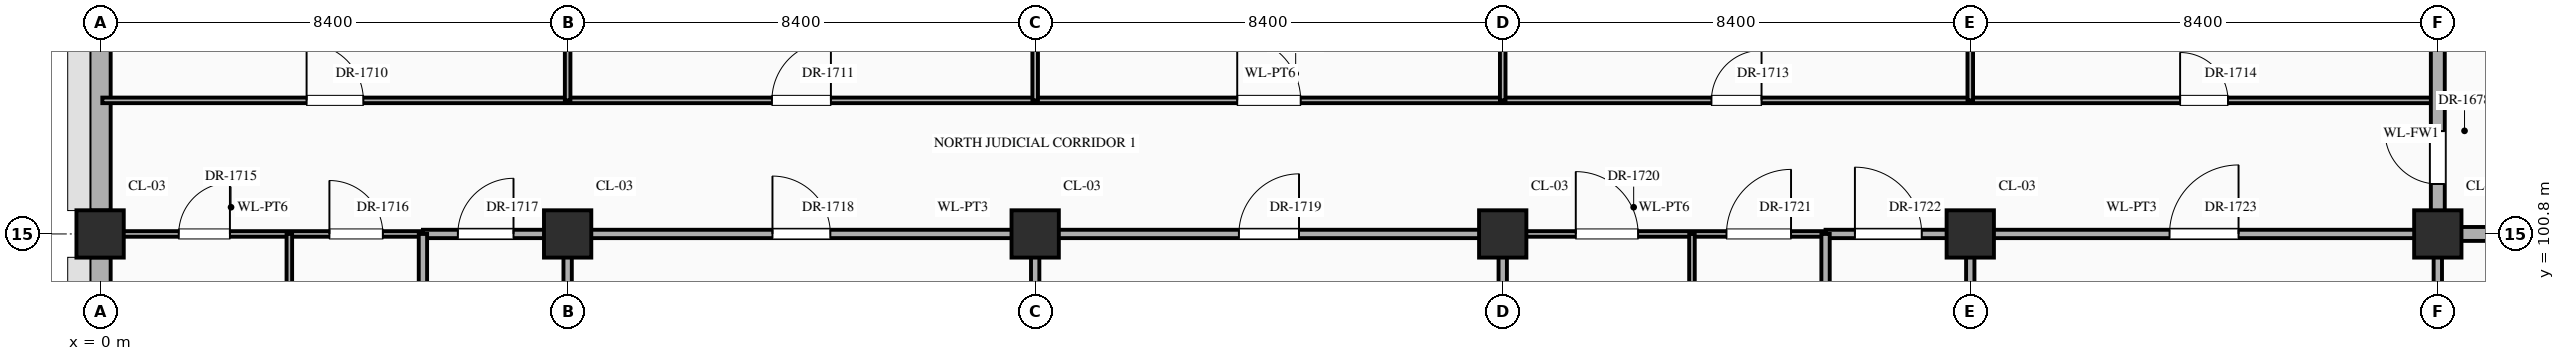
"""IFC4 building model, lengths in metres.
Left out: names, types, materials, properties, quantities, classifications, styles, units other than length and angle.
Written with IfcOpenShell. Run it as: python <this file> out.ifc"""

import sys

from ifc_helpers import new_model, si_unit, direction, frame, frame_2d, origin, origin_2d, place, context, subcontext, project, spatial, rectangle, extrude, element, fill, save


model = new_model("IFC4")
c1 = context("Model", 3, precision=1e-05, world=origin(), true_north=direction((0.0, 1.0)))
c2 = subcontext(c1, "Body", "Model", "MODEL_VIEW")
j1 = project(units=[si_unit("LENGTHUNIT", "METRE"), si_unit("PLANEANGLEUNIT", "RADIAN")], contexts=[c1])
p1 = place(None, origin())
s1 = spatial("IfcSite", under=j1, at=p1, CompositionType="ELEMENT")
p2 = place(p1, origin())
s2 = spatial("IfcBuilding", under=s1, at=p2, CompositionType="ELEMENT")
p3 = place(p2, frame((0.0, 0.0, 16.2)))
s3 = spatial("IfcBuildingStorey", under=s2, at=p3, CompositionType="ELEMENT", Elevation=16.2)
for number, where, z_axis, x_axis in (
    (1, (0.0, 100.8, 0.0), (0.0, 0.0, 1.0), (1.0, 0.0, 0.0)),
    (2, (8.4, 100.8, 0.0), (0.0, 0.0, 1.0), (1.0, 0.0, 0.0)),
    (3, (16.8, 100.8, 0.0), (0.0, 0.0, 1.0), (1.0, 0.0, 0.0)),
    (4, (25.2, 100.8, 0.0), (0.0, 0.0, 1.0), (1.0, 0.0, 0.0)),
    (5, (33.6, 100.8, 0.0), (0.0, 0.0, 1.0), (1.0, 0.0, 0.0)),
    (6, (42.0, 100.8, 0.0), (0.0, 0.0, 1.0), (1.0, 0.0, 0.0)),
):
    element("IfcColumn", number, at=place(p3, frame(where, z_axis=z_axis, x_axis=x_axis)), inside=s3, PredefinedType="COLUMN", context=c2, shape_type="SweptSolid", body=[
        extrude(rectangle(XDim=0.85, YDim=0.85, at=origin_2d()), origin(), (0.0, 0.0, 1.0), 5.4),
    ])
p4 = place(p3, frame((0.0, 94.02, 0.0), z_axis=(0.0, 0.0, 1.0), x_axis=(0.0, 1.0, 0.0)))
e7 = element("IfcWall", 7, at=p4, inside=s3, PredefinedType="STANDARD", context=c2, shape_type="SweptSolid", body=[
    extrude(rectangle(XDim=6.36, YDim=0.38, at=frame_2d((3.18, 0.0))), origin(), (0.0, 0.0, 1.0), 4.55),
])
p5 = place(p4, frame((3.955, 0.0, 0.85)))
e8 = element("IfcOpeningElement", 8, at=p5, cuts=e7, PredefinedType="OPENING", context=c2, shape_type="SweptSolid", body=[
    extrude(rectangle(XDim=1.05, YDim=1.38, at=frame_2d((0.525, 0.69))), frame((0.0, 0.202, 0.0), z_axis=(0.0, -1.0, 0.0), x_axis=(1.0, 0.0, 0.0)), (0.0, 0.0, 1.0), 0.404),
])
p6 = place(p3, frame((0.0, 101.22, 0.0), z_axis=(0.0, 0.0, 1.0), x_axis=(0.0, 1.0, 0.0)))
e9 = element("IfcWall", 9, at=p6, inside=s3, PredefinedType="STANDARD", context=c2, shape_type="SweptSolid", body=[
    extrude(rectangle(XDim=6.36, YDim=0.38, at=frame_2d((3.18, 0.0))), origin(), (0.0, 0.0, 1.0), 4.55),
])
p7 = place(p6, frame((3.955, 0.0, 0.85)))
e10 = element("IfcOpeningElement", 10, at=p7, cuts=e9, PredefinedType="OPENING", context=c2, shape_type="SweptSolid", body=[
    extrude(rectangle(XDim=1.05, YDim=1.56, at=frame_2d((0.525, 0.78))), frame((0.0, 0.202, 0.0), z_axis=(0.0, -1.0, 0.0), x_axis=(1.0, 0.0, 0.0)), (0.0, 0.0, 1.0), 0.404),
])
p8 = place(p3, frame((0.04, 100.8, 0.0), z_axis=(0.0, 0.0, 1.0), x_axis=(1.0, 0.0, 0.0)))
e11 = element("IfcWall", 11, at=p8, inside=s3, PredefinedType="STANDARD", context=c2, shape_type="SweptSolid", body=[
    extrude(rectangle(XDim=5.76, YDim=0.1, at=frame_2d((2.88, 0.0))), origin(), (0.0, 0.0, 1.0), 4.35),
])
p9 = place(p8, frame((1.373, 0.0, 0.0)))
e12 = element("IfcOpeningElement", 12, at=p9, cuts=e11, PredefinedType="OPENING", context=c2, shape_type="SweptSolid", body=[
    extrude(rectangle(XDim=0.92, YDim=2.15, at=frame_2d((0.46, 1.075))), frame((0.0, 0.062, 0.0), z_axis=(0.0, -1.0, 0.0), x_axis=(1.0, 0.0, 0.0)), (0.0, 0.0, 1.0), 0.124),
])
p10 = place(p8, frame((4.08, 0.0, 0.0)))
e13 = element("IfcOpeningElement", 13, at=p10, cuts=e11, PredefinedType="OPENING", context=c2, shape_type="SweptSolid", body=[
    extrude(rectangle(XDim=0.96, YDim=2.2, at=frame_2d((0.48, 1.1))), frame((0.0, 0.062, 0.0), z_axis=(0.0, -1.0, 0.0), x_axis=(1.0, 0.0, 0.0)), (0.0, 0.0, 1.0), 0.124),
])
p11 = place(p3, frame((5.8, 100.8, 0.0), z_axis=(0.0, 0.0, 1.0), x_axis=(1.0, 0.0, 0.0)))
e14 = element("IfcWall", 14, at=p11, inside=s3, PredefinedType="STANDARD", context=c2, shape_type="SweptSolid", body=[
    extrude(rectangle(XDim=19.4, YDim=0.15, at=frame_2d((9.7, 0.0))), origin(), (0.0, 0.0, 1.0), 4.2),
])
p12 = place(p11, frame((0.627, 0.0, 0.0)))
e15 = element("IfcOpeningElement", 15, at=p12, cuts=e14, PredefinedType="OPENING", context=c2, shape_type="SweptSolid", body=[
    extrude(rectangle(XDim=1.0, YDim=2.25, at=frame_2d((0.5, 1.125))), frame((0.0, 0.087, 0.0), z_axis=(0.0, -1.0, 0.0), x_axis=(1.0, 0.0, 0.0)), (0.0, 0.0, 1.0), 0.174),
])
p13 = place(p11, frame((6.28, 0.0, 0.0)))
e16 = element("IfcOpeningElement", 16, at=p13, cuts=e14, PredefinedType="OPENING", context=c2, shape_type="SweptSolid", body=[
    extrude(rectangle(XDim=1.04, YDim=2.2, at=frame_2d((0.52, 1.1))), frame((0.0, 0.087, 0.0), z_axis=(0.0, -1.0, 0.0), x_axis=(1.0, 0.0, 0.0)), (0.0, 0.0, 1.0), 0.174),
])
p14 = place(p11, frame((14.66, 0.0, 0.0)))
e17 = element("IfcOpeningElement", 17, at=p14, cuts=e14, PredefinedType="OPENING", context=c2, shape_type="SweptSolid", body=[
    extrude(rectangle(XDim=1.08, YDim=2.25, at=frame_2d((0.54, 1.125))), frame((0.0, 0.087, 0.0), z_axis=(0.0, -1.0, 0.0), x_axis=(1.0, 0.0, 0.0)), (0.0, 0.0, 1.0), 0.174),
])
p15 = place(p3, frame((25.2, 100.8, 0.0), z_axis=(0.0, 0.0, 1.0), x_axis=(1.0, 0.0, 0.0)))
e18 = element("IfcWall", 18, at=p15, inside=s3, PredefinedType="STANDARD", context=c2, shape_type="SweptSolid", body=[
    extrude(rectangle(XDim=5.8, YDim=0.1, at=frame_2d((2.9, 0.0))), origin(), (0.0, 0.0, 1.0), 4.27),
])
p16 = place(p15, frame((1.312, 0.0, 0.0)))
e19 = element("IfcOpeningElement", 19, at=p16, cuts=e18, PredefinedType="OPENING", context=c2, shape_type="SweptSolid", body=[
    extrude(rectangle(XDim=1.12, YDim=2.25, at=frame_2d((0.56, 1.125))), frame((0.0, 0.062, 0.0), z_axis=(0.0, -1.0, 0.0), x_axis=(1.0, 0.0, 0.0)), (0.0, 0.0, 1.0), 0.124),
])
p17 = place(p15, frame((4.02, 0.0, 0.0)))
e20 = element("IfcOpeningElement", 20, at=p17, cuts=e18, PredefinedType="OPENING", context=c2, shape_type="SweptSolid", body=[
    extrude(rectangle(XDim=1.16, YDim=2.3, at=frame_2d((0.58, 1.15))), frame((0.0, 0.062, 0.0), z_axis=(0.0, -1.0, 0.0), x_axis=(1.0, 0.0, 0.0)), (0.0, 0.0, 1.0), 0.124),
])
p18 = place(p3, frame((31.0, 100.8, 0.0), z_axis=(0.0, 0.0, 1.0), x_axis=(1.0, 0.0, 0.0)))
e21 = element("IfcWall", 21, at=p18, inside=s3, PredefinedType="STANDARD", context=c2, shape_type="SweptSolid", body=[
    extrude(rectangle(XDim=11.0, YDim=0.15, at=frame_2d((5.5, 0.0))), origin(), (0.0, 0.0, 1.0), 4.27),
])
p19 = place(p18, frame((0.528, 0.0, 0.0)))
e22 = element("IfcOpeningElement", 22, at=p19, cuts=e21, PredefinedType="OPENING", context=c2, shape_type="SweptSolid", body=[
    extrude(rectangle(XDim=1.2, YDim=2.35, at=frame_2d((0.6, 1.175))), frame((0.0, 0.087, 0.0), z_axis=(0.0, -1.0, 0.0), x_axis=(1.0, 0.0, 0.0)), (0.0, 0.0, 1.0), 0.174),
])
p20 = place(p18, frame((6.18, 0.0, 0.0)))
e23 = element("IfcOpeningElement", 23, at=p20, cuts=e21, PredefinedType="OPENING", context=c2, shape_type="SweptSolid", body=[
    extrude(rectangle(XDim=1.24, YDim=2.3, at=frame_2d((0.62, 1.15))), frame((0.0, 0.087, 0.0), z_axis=(0.0, -1.0, 0.0), x_axis=(1.0, 0.0, 0.0)), (0.0, 0.0, 1.0), 0.174),
])
p21 = place(p3, frame((42.0, 100.8, 0.0), z_axis=(0.0, 0.0, 1.0), x_axis=(1.0, 0.0, 0.0)))
e24 = element("IfcWall", 24, at=p21, inside=s3, PredefinedType="STANDARD", context=c2, shape_type="SweptSolid", body=[
    extrude(rectangle(XDim=4.2, YDim=0.25, at=frame_2d((2.1, 0.0))), origin(), (0.0, 0.0, 1.0), 4.27),
])
p22 = place(p3, frame((0.04, 103.2, 0.0), z_axis=(0.0, 0.0, 1.0), x_axis=(1.0, 0.0, 0.0)))
e25 = element("IfcWall", 25, at=p22, inside=s3, PredefinedType="STANDARD", context=c2, shape_type="SweptSolid", body=[
    extrude(rectangle(XDim=41.96, YDim=0.1, at=frame_2d((20.98, 0.0))), origin(), (0.0, 0.0, 1.0), 5.05),
])
p23 = place(p22, frame((3.67, 0.0, 0.0)))
e26 = element("IfcOpeningElement", 26, at=p23, cuts=e25, PredefinedType="OPENING", context=c2, shape_type="SweptSolid", body=[
    extrude(rectangle(XDim=1.02, YDim=2.4, at=frame_2d((0.51, 1.2))), frame((0.0, 0.062, 0.0), z_axis=(0.0, -1.0, 0.0), x_axis=(1.0, 0.0, 0.0)), (0.0, 0.0, 1.0), 0.124),
])
p24 = place(p22, frame((12.03, 0.0, 0.0)))
e27 = element("IfcOpeningElement", 27, at=p24, cuts=e25, PredefinedType="OPENING", context=c2, shape_type="SweptSolid", body=[
    extrude(rectangle(XDim=1.06, YDim=2.4, at=frame_2d((0.53, 1.2))), frame((0.0, 0.062, 0.0), z_axis=(0.0, -1.0, 0.0), x_axis=(1.0, 0.0, 0.0)), (0.0, 0.0, 1.0), 0.124),
])
p25 = place(p22, frame((20.39, 0.0, 0.0)))
e28 = element("IfcOpeningElement", 28, at=p25, cuts=e25, PredefinedType="OPENING", context=c2, shape_type="SweptSolid", body=[
    extrude(rectangle(XDim=1.14, YDim=2.4, at=frame_2d((0.57, 1.2))), frame((0.0, 0.062, 0.0), z_axis=(0.0, -1.0, 0.0), x_axis=(1.0, 0.0, 0.0)), (0.0, 0.0, 1.0), 0.124),
])
p26 = place(p22, frame((28.91, 0.0, 0.0)))
e29 = element("IfcOpeningElement", 29, at=p26, cuts=e25, PredefinedType="OPENING", context=c2, shape_type="SweptSolid", body=[
    extrude(rectangle(XDim=0.9, YDim=2.15, at=frame_2d((0.45, 1.075))), frame((0.0, 0.062, 0.0), z_axis=(0.0, -1.0, 0.0), x_axis=(1.0, 0.0, 0.0)), (0.0, 0.0, 1.0), 0.124),
])
p27 = place(p22, frame((37.33, 0.0, 0.0)))
e30 = element("IfcOpeningElement", 30, at=p27, cuts=e25, PredefinedType="OPENING", context=c2, shape_type="SweptSolid", body=[
    extrude(rectangle(XDim=0.86, YDim=2.1, at=frame_2d((0.43, 1.05))), frame((0.0, 0.062, 0.0), z_axis=(0.0, -1.0, 0.0), x_axis=(1.0, 0.0, 0.0)), (0.0, 0.0, 1.0), 0.124),
])
p28 = place(p3, frame((3.4, 96.0, 0.0), z_axis=(0.0, 0.0, 1.0), x_axis=(0.0, 1.0, 0.0)))
e31 = element("IfcWall", 31, at=p28, inside=s3, PredefinedType="STANDARD", context=c2, shape_type="SweptSolid", body=[
    extrude(rectangle(XDim=4.8, YDim=0.1, at=frame_2d((2.4, 0.0))), origin(), (0.0, 0.0, 1.0), 5.2),
])
p29 = place(p28, frame((1.84, 0.0, 0.0)))
e32 = element("IfcOpeningElement", 32, at=p29, cuts=e31, PredefinedType="OPENING", context=c2, shape_type="SweptSolid", body=[
    extrude(rectangle(XDim=1.12, YDim=2.25, at=frame_2d((0.56, 1.125))), frame((0.0, 0.062, 0.0), z_axis=(0.0, -1.0, 0.0), x_axis=(1.0, 0.0, 0.0)), (0.0, 0.0, 1.0), 0.124),
])
p30 = place(p3, frame((5.8, 96.0, 0.0), z_axis=(0.0, 0.0, 1.0), x_axis=(0.0, 1.0, 0.0)))
e33 = element("IfcWall", 33, at=p30, inside=s3, PredefinedType="STANDARD", context=c2, shape_type="SweptSolid", body=[
    extrude(rectangle(XDim=4.8, YDim=0.15, at=frame_2d((2.4, 0.0))), origin(), (0.0, 0.0, 1.0), 5.2),
])
p31 = place(p30, frame((1.82, 0.0, 0.0)))
e34 = element("IfcOpeningElement", 34, at=p31, cuts=e33, PredefinedType="OPENING", context=c2, shape_type="SweptSolid", body=[
    extrude(rectangle(XDim=1.16, YDim=2.3, at=frame_2d((0.58, 1.15))), frame((0.0, 0.087, 0.0), z_axis=(0.0, -1.0, 0.0), x_axis=(1.0, 0.0, 0.0)), (0.0, 0.0, 1.0), 0.174),
])
p32 = place(p3, frame((8.4, 96.0, 0.0), z_axis=(0.0, 0.0, 1.0), x_axis=(0.0, 1.0, 0.0)))
e35 = element("IfcWall", 35, at=p32, inside=s3, PredefinedType="STANDARD", context=c2, shape_type="SweptSolid", body=[
    extrude(rectangle(XDim=4.8, YDim=0.15, at=frame_2d((2.4, 0.0))), origin(), (0.0, 0.0, 1.0), 4.45),
])
p33 = place(p3, frame((8.4, 103.2, 0.0), z_axis=(0.0, 0.0, 1.0), x_axis=(0.0, 1.0, 0.0)))
e36 = element("IfcWall", 36, at=p33, inside=s3, PredefinedType="STANDARD", context=c2, shape_type="SweptSolid", body=[
    extrude(rectangle(XDim=4.76, YDim=0.1, at=frame_2d((2.38, 0.0))), origin(), (0.0, 0.0, 1.0), 4.45),
])
p34 = place(p3, frame((16.8, 96.0, 0.0), z_axis=(0.0, 0.0, 1.0), x_axis=(0.0, 1.0, 0.0)))
e37 = element("IfcWall", 37, at=p34, inside=s3, PredefinedType="STANDARD", context=c2, shape_type="SweptSolid", body=[
    extrude(rectangle(XDim=4.8, YDim=0.15, at=frame_2d((2.4, 0.0))), origin(), (0.0, 0.0, 1.0), 4.3),
])
p35 = place(p3, frame((16.8, 103.2, 0.0), z_axis=(0.0, 0.0, 1.0), x_axis=(0.0, 1.0, 0.0)))
e38 = element("IfcWall", 38, at=p35, inside=s3, PredefinedType="STANDARD", context=c2, shape_type="SweptSolid", body=[
    extrude(rectangle(XDim=4.76, YDim=0.1, at=frame_2d((2.38, 0.0))), origin(), (0.0, 0.0, 1.0), 4.3),
])
p36 = place(p3, frame((25.2, 96.0, 0.0), z_axis=(0.0, 0.0, 1.0), x_axis=(0.0, 1.0, 0.0)))
e39 = element("IfcWall", 39, at=p36, inside=s3, PredefinedType="STANDARD", context=c2, shape_type="SweptSolid", body=[
    extrude(rectangle(XDim=4.8, YDim=0.15, at=frame_2d((2.4, 0.0))), origin(), (0.0, 0.0, 1.0), 4.3),
])
p37 = place(p3, frame((25.2, 103.2, 0.0), z_axis=(0.0, 0.0, 1.0), x_axis=(0.0, 1.0, 0.0)))
e40 = element("IfcWall", 40, at=p37, inside=s3, PredefinedType="STANDARD", context=c2, shape_type="SweptSolid", body=[
    extrude(rectangle(XDim=4.76, YDim=0.1, at=frame_2d((2.38, 0.0))), origin(), (0.0, 0.0, 1.0), 4.3),
])
p38 = place(p3, frame((28.6, 96.0, 0.0), z_axis=(0.0, 0.0, 1.0), x_axis=(0.0, 1.0, 0.0)))
e41 = element("IfcWall", 41, at=p38, inside=s3, PredefinedType="STANDARD", context=c2, shape_type="SweptSolid", body=[
    extrude(rectangle(XDim=4.8, YDim=0.1, at=frame_2d((2.4, 0.0))), origin(), (0.0, 0.0, 1.0), 5.12),
])
p39 = place(p38, frame((1.8, 0.0, 0.0)))
e42 = element("IfcOpeningElement", 42, at=p39, cuts=e41, PredefinedType="OPENING", context=c2, shape_type="SweptSolid", body=[
    extrude(rectangle(XDim=1.2, YDim=2.35, at=frame_2d((0.6, 1.175))), frame((0.0, 0.062, 0.0), z_axis=(0.0, -1.0, 0.0), x_axis=(1.0, 0.0, 0.0)), (0.0, 0.0, 1.0), 0.124),
])
p40 = place(p3, frame((31.0, 96.0, 0.0), z_axis=(0.0, 0.0, 1.0), x_axis=(0.0, 1.0, 0.0)))
e43 = element("IfcWall", 43, at=p40, inside=s3, PredefinedType="STANDARD", context=c2, shape_type="SweptSolid", body=[
    extrude(rectangle(XDim=4.8, YDim=0.15, at=frame_2d((2.4, 0.0))), origin(), (0.0, 0.0, 1.0), 5.12),
])
p41 = place(p40, frame((1.78, 0.0, 0.0)))
e44 = element("IfcOpeningElement", 44, at=p41, cuts=e43, PredefinedType="OPENING", context=c2, shape_type="SweptSolid", body=[
    extrude(rectangle(XDim=1.24, YDim=2.3, at=frame_2d((0.62, 1.15))), frame((0.0, 0.087, 0.0), z_axis=(0.0, -1.0, 0.0), x_axis=(1.0, 0.0, 0.0)), (0.0, 0.0, 1.0), 0.174),
])
p42 = place(p3, frame((33.6, 96.0, 0.0), z_axis=(0.0, 0.0, 1.0), x_axis=(0.0, 1.0, 0.0)))
e45 = element("IfcWall", 45, at=p42, inside=s3, PredefinedType="STANDARD", context=c2, shape_type="SweptSolid", body=[
    extrude(rectangle(XDim=4.8, YDim=0.15, at=frame_2d((2.4, 0.0))), origin(), (0.0, 0.0, 1.0), 4.37),
])
p43 = place(p3, frame((33.6, 103.2, 0.0), z_axis=(0.0, 0.0, 1.0), x_axis=(0.0, 1.0, 0.0)))
e46 = element("IfcWall", 46, at=p43, inside=s3, PredefinedType="STANDARD", context=c2, shape_type="SweptSolid", body=[
    extrude(rectangle(XDim=4.76, YDim=0.1, at=frame_2d((2.38, 0.0))), origin(), (0.0, 0.0, 1.0), 4.37),
])
p44 = place(p3, frame((42.0, 96.0, 0.0), z_axis=(0.0, 0.0, 1.0), x_axis=(0.0, 1.0, 0.0)))
e47 = element("IfcWall", 47, at=p44, inside=s3, PredefinedType="STANDARD", context=c2, shape_type="SweptSolid", body=[
    extrude(rectangle(XDim=4.8, YDim=0.15, at=frame_2d((2.4, 0.0))), origin(), (0.0, 0.0, 1.0), 4.37),
])
p45 = place(p3, frame((42.0, 100.8, 0.0), z_axis=(0.0, 0.0, 1.0), x_axis=(0.0, 1.0, 0.0)))
e48 = element("IfcWall", 48, at=p45, inside=s3, PredefinedType="STANDARD", context=c2, shape_type="SweptSolid", body=[
    extrude(rectangle(XDim=3.6, YDim=0.25, at=frame_2d((1.8, 0.0))), origin(), (0.0, 0.0, 1.0), 4.37),
])
p46 = place(p45, frame((0.897, 0.0, 0.0)))
e49 = element("IfcOpeningElement", 49, at=p46, cuts=e48, PredefinedType="OPENING", context=c2, shape_type="SweptSolid", body=[
    extrude(rectangle(XDim=0.95, YDim=2.15, at=frame_2d((0.475, 1.075))), frame((0.0, 0.137, 0.0), z_axis=(0.0, -1.0, 0.0), x_axis=(1.0, 0.0, 0.0)), (0.0, 0.0, 1.0), 0.274),
])
p47 = place(p46, origin())
e50 = element("IfcDoor", 50, at=p47, inside=s3, OperationType="SINGLE_SWING_RIGHT", PredefinedType="DOOR", context=c2, shape_type="SweptSolid", body=[
    extrude(rectangle(XDim=0.95, YDim=2.15, at=frame_2d((0.475, 1.075))), frame((0.0, 0.025, 0.0), z_axis=(0.0, -1.0, 0.0), x_axis=(1.0, 0.0, 0.0)), (0.0, 0.0, 1.0), 0.05),
])
fill(e49, e50)
p48 = place(p23, origin())
e51 = element("IfcDoor", 51, at=p48, inside=s3, OperationType="SINGLE_SWING_LEFT", PredefinedType="DOOR", context=c2, shape_type="SweptSolid", body=[
    extrude(rectangle(XDim=1.02, YDim=2.4, at=frame_2d((0.51, 1.2))), frame((0.0, 0.025, 0.0), z_axis=(0.0, -1.0, 0.0), x_axis=(1.0, 0.0, 0.0)), (0.0, 0.0, 1.0), 0.05),
])
fill(e26, e51)
p49 = place(p24, origin())
e52 = element("IfcDoor", 52, at=p49, inside=s3, OperationType="SINGLE_SWING_RIGHT", PredefinedType="DOOR", context=c2, shape_type="SweptSolid", body=[
    extrude(rectangle(XDim=1.06, YDim=2.4, at=frame_2d((0.53, 1.2))), frame((0.0, 0.025, 0.0), z_axis=(0.0, -1.0, 0.0), x_axis=(1.0, 0.0, 0.0)), (0.0, 0.0, 1.0), 0.05),
])
fill(e27, e52)
p50 = place(p25, origin())
e53 = element("IfcDoor", 53, at=p50, inside=s3, OperationType="SINGLE_SWING_LEFT", PredefinedType="DOOR", context=c2, shape_type="SweptSolid", body=[
    extrude(rectangle(XDim=1.14, YDim=2.4, at=frame_2d((0.57, 1.2))), frame((0.0, 0.025, 0.0), z_axis=(0.0, -1.0, 0.0), x_axis=(1.0, 0.0, 0.0)), (0.0, 0.0, 1.0), 0.05),
])
fill(e28, e53)
p51 = place(p26, origin())
e54 = element("IfcDoor", 54, at=p51, inside=s3, OperationType="SINGLE_SWING_RIGHT", PredefinedType="DOOR", context=c2, shape_type="SweptSolid", body=[
    extrude(rectangle(XDim=0.9, YDim=2.15, at=frame_2d((0.45, 1.075))), frame((0.0, 0.025, 0.0), z_axis=(0.0, -1.0, 0.0), x_axis=(1.0, 0.0, 0.0)), (0.0, 0.0, 1.0), 0.05),
])
fill(e29, e54)
p52 = place(p27, origin())
e55 = element("IfcDoor", 55, at=p52, inside=s3, OperationType="SINGLE_SWING_LEFT", PredefinedType="DOOR", context=c2, shape_type="SweptSolid", body=[
    extrude(rectangle(XDim=0.86, YDim=2.1, at=frame_2d((0.43, 1.05))), frame((0.0, 0.025, 0.0), z_axis=(0.0, -1.0, 0.0), x_axis=(1.0, 0.0, 0.0)), (0.0, 0.0, 1.0), 0.05),
])
fill(e30, e55)
p53 = place(p9, origin())
e56 = element("IfcDoor", 56, at=p53, inside=s3, OperationType="SINGLE_SWING_RIGHT", PredefinedType="DOOR", context=c2, shape_type="SweptSolid", body=[
    extrude(rectangle(XDim=0.92, YDim=2.15, at=frame_2d((0.46, 1.075))), frame((0.0, 0.025, 0.0), z_axis=(0.0, -1.0, 0.0), x_axis=(1.0, 0.0, 0.0)), (0.0, 0.0, 1.0), 0.05),
])
fill(e12, e56)
p54 = place(p10, origin())
e57 = element("IfcDoor", 57, at=p54, inside=s3, OperationType="SINGLE_SWING_LEFT", PredefinedType="DOOR", context=c2, shape_type="SweptSolid", body=[
    extrude(rectangle(XDim=0.96, YDim=2.2, at=frame_2d((0.48, 1.1))), frame((0.0, 0.025, 0.0), z_axis=(0.0, -1.0, 0.0), x_axis=(1.0, 0.0, 0.0)), (0.0, 0.0, 1.0), 0.05),
])
fill(e13, e57)
p55 = place(p12, origin())
e58 = element("IfcDoor", 58, at=p55, inside=s3, OperationType="SINGLE_SWING_RIGHT", PredefinedType="DOOR", context=c2, shape_type="SweptSolid", body=[
    extrude(rectangle(XDim=1.0, YDim=2.25, at=frame_2d((0.5, 1.125))), frame((0.0, 0.025, 0.0), z_axis=(0.0, -1.0, 0.0), x_axis=(1.0, 0.0, 0.0)), (0.0, 0.0, 1.0), 0.05),
])
fill(e15, e58)
p56 = place(p13, origin())
e59 = element("IfcDoor", 59, at=p56, inside=s3, OperationType="SINGLE_SWING_LEFT", PredefinedType="DOOR", context=c2, shape_type="SweptSolid", body=[
    extrude(rectangle(XDim=1.04, YDim=2.2, at=frame_2d((0.52, 1.1))), frame((0.0, 0.025, 0.0), z_axis=(0.0, -1.0, 0.0), x_axis=(1.0, 0.0, 0.0)), (0.0, 0.0, 1.0), 0.05),
])
fill(e16, e59)
p57 = place(p14, origin())
e60 = element("IfcDoor", 60, at=p57, inside=s3, OperationType="SINGLE_SWING_RIGHT", PredefinedType="DOOR", context=c2, shape_type="SweptSolid", body=[
    extrude(rectangle(XDim=1.08, YDim=2.25, at=frame_2d((0.54, 1.125))), frame((0.0, 0.025, 0.0), z_axis=(0.0, -1.0, 0.0), x_axis=(1.0, 0.0, 0.0)), (0.0, 0.0, 1.0), 0.05),
])
fill(e17, e60)
p58 = place(p16, origin())
e61 = element("IfcDoor", 61, at=p58, inside=s3, OperationType="SINGLE_SWING_LEFT", PredefinedType="DOOR", context=c2, shape_type="SweptSolid", body=[
    extrude(rectangle(XDim=1.12, YDim=2.25, at=frame_2d((0.56, 1.125))), frame((0.0, 0.025, 0.0), z_axis=(0.0, -1.0, 0.0), x_axis=(1.0, 0.0, 0.0)), (0.0, 0.0, 1.0), 0.05),
])
fill(e19, e61)
p59 = place(p17, origin())
e62 = element("IfcDoor", 62, at=p59, inside=s3, OperationType="SINGLE_SWING_RIGHT", PredefinedType="DOOR", context=c2, shape_type="SweptSolid", body=[
    extrude(rectangle(XDim=1.16, YDim=2.3, at=frame_2d((0.58, 1.15))), frame((0.0, 0.025, 0.0), z_axis=(0.0, -1.0, 0.0), x_axis=(1.0, 0.0, 0.0)), (0.0, 0.0, 1.0), 0.05),
])
fill(e20, e62)
p60 = place(p19, origin())
e63 = element("IfcDoor", 63, at=p60, inside=s3, OperationType="SINGLE_SWING_LEFT", PredefinedType="DOOR", context=c2, shape_type="SweptSolid", body=[
    extrude(rectangle(XDim=1.2, YDim=2.35, at=frame_2d((0.6, 1.175))), frame((0.0, 0.025, 0.0), z_axis=(0.0, -1.0, 0.0), x_axis=(1.0, 0.0, 0.0)), (0.0, 0.0, 1.0), 0.05),
])
fill(e22, e63)
p61 = place(p20, origin())
e64 = element("IfcDoor", 64, at=p61, inside=s3, OperationType="SINGLE_SWING_RIGHT", PredefinedType="DOOR", context=c2, shape_type="SweptSolid", body=[
    extrude(rectangle(XDim=1.24, YDim=2.3, at=frame_2d((0.62, 1.15))), frame((0.0, 0.025, 0.0), z_axis=(0.0, -1.0, 0.0), x_axis=(1.0, 0.0, 0.0)), (0.0, 0.0, 1.0), 0.05),
])
fill(e23, e64)
save(model, sys.argv[1])
